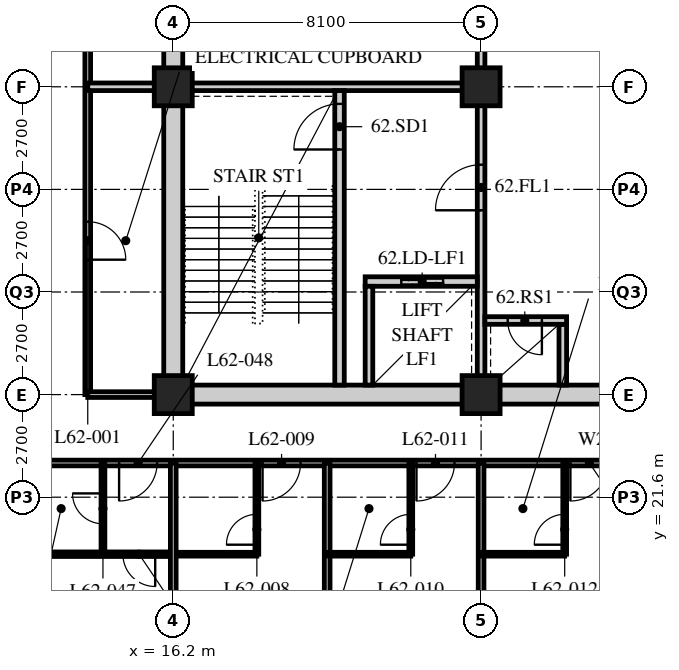
"""IFC4 building model, lengths in metres.
Left out: names, types, materials, properties, quantities, classifications, styles, units other than length and angle.
Written with IfcOpenShell. Run it as: python <this file> out.ifc"""

import sys

from ifc_helpers import new_model, si_unit, direction, frame, frame_2d, origin, origin_2d, place, context, subcontext, project, spatial, rectangle, hollow_rectangle, extrude, element, fill, save


model = new_model("IFC4")
c1 = context("Model", 3, precision=1e-05, world=origin(), true_north=direction((0.0, 1.0)))
c2 = subcontext(c1, "Body", "Model", "MODEL_VIEW")
j1 = project(units=[si_unit("LENGTHUNIT", "METRE"), si_unit("PLANEANGLEUNIT", "RADIAN")], contexts=[c1])
p1 = place(None, origin())
s1 = spatial("IfcSite", under=j1, at=p1, CompositionType="ELEMENT")
p2 = place(p1, origin())
s2 = spatial("IfcBuilding", under=s1, at=p2, CompositionType="ELEMENT")
p3 = place(p2, frame((0.0, 0.0, 242.4)))
s3 = spatial("IfcBuildingStorey", under=s2, at=p3, CompositionType="ELEMENT", Elevation=242.4)
for number, where, z_axis, x_axis in (
    (1, (16.2, 24.3, 0.0), (0.0, 0.0, 1.0), (1.0, 0.0, 0.0)),
    (2, (16.2, 32.4, 0.0), (0.0, 0.0, 1.0), (1.0, 0.0, 0.0)),
    (3, (24.3, 24.3, 0.0), (0.0, 0.0, 1.0), (1.0, 0.0, 0.0)),
    (4, (24.3, 32.4, 0.0), (0.0, 0.0, 1.0), (1.0, 0.0, 0.0)),
):
    element("IfcColumn", number, at=place(p3, frame(where, z_axis=z_axis, x_axis=x_axis)), inside=s3, PredefinedType="COLUMN", context=c2, shape_type="SweptSolid", body=[
        extrude(hollow_rectangle(XDim=1.0, YDim=1.0, WallThickness=0.1, at=origin_2d()), origin(), (0.0, 0.0, 1.0), 3.9),
    ])
p4 = place(p3, frame((12.15, 22.5, 0.0), z_axis=(0.0, 0.0, 1.0), x_axis=(1.0, 0.0, 0.0)))
e5 = element("IfcWall", 5, at=p4, inside=s3, PredefinedType="PARTITIONING", context=c2, shape_type="SweptSolid", body=[
    extrude(rectangle(XDim=32.4, YDim=0.15, at=frame_2d((16.2, 0.0))), origin(), (0.0, 0.0, 1.0), 3.69),
])
p5 = place(p4, frame((6.4, 0.0, 0.0)))
e6 = element("IfcOpeningElement", 6, at=p5, cuts=e5, PredefinedType="OPENING", context=c2, shape_type="SweptSolid", body=[
    extrude(rectangle(XDim=1.0, YDim=2.1, at=frame_2d((0.5, 1.05))), frame((0.0, 0.085, 0.0), z_axis=(0.0, -1.0, 0.0), x_axis=(1.0, 0.0, 0.0)), (0.0, 0.0, 1.0), 0.17),
])
p6 = place(p4, frame((10.45, 0.0, 0.0)))
e7 = element("IfcOpeningElement", 7, at=p6, cuts=e5, PredefinedType="OPENING", context=c2, shape_type="SweptSolid", body=[
    extrude(rectangle(XDim=1.0, YDim=2.1, at=frame_2d((0.5, 1.05))), frame((0.0, 0.085, 0.0), z_axis=(0.0, -1.0, 0.0), x_axis=(1.0, 0.0, 0.0)), (0.0, 0.0, 1.0), 0.17),
])
p7 = place(p4, frame((14.5, 0.0, 0.0)))
e8 = element("IfcOpeningElement", 8, at=p7, cuts=e5, PredefinedType="OPENING", context=c2, shape_type="SweptSolid", body=[
    extrude(rectangle(XDim=1.0, YDim=2.1, at=frame_2d((0.5, 1.05))), frame((0.0, 0.085, 0.0), z_axis=(0.0, -1.0, 0.0), x_axis=(1.0, 0.0, 0.0)), (0.0, 0.0, 1.0), 0.17),
])
p8 = place(p4, frame((17.725, 0.0, 0.0)))
e9 = element("IfcOpeningElement", 9, at=p8, cuts=e5, PredefinedType="OPENING", context=c2, shape_type="SweptSolid", body=[
    extrude(rectangle(XDim=1.0, YDim=2.1, at=frame_2d((0.5, 1.05))), frame((0.0, 0.085, 0.0), z_axis=(0.0, -1.0, 0.0), x_axis=(1.0, 0.0, 0.0)), (0.0, 0.0, 1.0), 0.17),
])
p9 = place(p4, frame((22.6, 0.0, 0.0)))
e10 = element("IfcOpeningElement", 10, at=p9, cuts=e5, PredefinedType="OPENING", context=c2, shape_type="SweptSolid", body=[
    extrude(rectangle(XDim=1.0, YDim=2.1, at=frame_2d((0.5, 1.05))), frame((0.0, 0.085, 0.0), z_axis=(0.0, -1.0, 0.0), x_axis=(1.0, 0.0, 0.0)), (0.0, 0.0, 1.0), 0.17),
])
p10 = place(p4, frame((26.65, 0.0, 0.0)))
e11 = element("IfcOpeningElement", 11, at=p10, cuts=e5, PredefinedType="OPENING", context=c2, shape_type="SweptSolid", body=[
    extrude(rectangle(XDim=1.0, YDim=2.1, at=frame_2d((0.5, 1.05))), frame((0.0, 0.085, 0.0), z_axis=(0.0, -1.0, 0.0), x_axis=(1.0, 0.0, 0.0)), (0.0, 0.0, 1.0), 0.17),
])
p11 = place(p4, frame((2.625, 0.0, 0.0)))
e12 = element("IfcOpeningElement", 12, at=p11, cuts=e5, PredefinedType="OPENING", context=c2, shape_type="SweptSolid", body=[
    extrude(rectangle(XDim=1.0, YDim=2.1, at=frame_2d((0.5, 1.05))), frame((0.0, 0.085, 0.0), z_axis=(0.0, -1.0, 0.0), x_axis=(1.0, 0.0, 0.0)), (0.0, 0.0, 1.0), 0.17),
])
p12 = place(p4, frame((28.775, 0.0, 0.0)))
e13 = element("IfcOpeningElement", 13, at=p12, cuts=e5, PredefinedType="OPENING", context=c2, shape_type="SweptSolid", body=[
    extrude(rectangle(XDim=1.0, YDim=2.1, at=frame_2d((0.5, 1.05))), frame((0.0, 0.085, 0.0), z_axis=(0.0, -1.0, 0.0), x_axis=(1.0, 0.0, 0.0)), (0.0, 0.0, 1.0), 0.17),
])
p13 = place(p3, frame((13.95, 46.8, 0.0), z_axis=(0.0, 0.0, 1.0), x_axis=(0.0, -1.0, 0.0)))
e14 = element("IfcWall", 14, at=p13, inside=s3, PredefinedType="PARTITIONING", context=c2, shape_type="SweptSolid", body=[
    extrude(rectangle(XDim=22.5, YDim=0.15, at=frame_2d((11.25, 0.0))), origin(), (0.0, 0.0, 1.0), 3.69),
])
p14 = place(p13, frame((17.95, 0.0, 0.0)))
e15 = element("IfcOpeningElement", 15, at=p14, cuts=e14, PredefinedType="OPENING", context=c2, shape_type="SweptSolid", body=[
    extrude(rectangle(XDim=1.0, YDim=2.1, at=frame_2d((0.5, 1.05))), frame((0.0, 0.085, 0.0), z_axis=(0.0, -1.0, 0.0), x_axis=(1.0, 0.0, 0.0)), (0.0, 0.0, 1.0), 0.17),
])
p15 = place(p13, frame((9.85, 0.0, 0.0)))
e16 = element("IfcOpeningElement", 16, at=p15, cuts=e14, PredefinedType="OPENING", context=c2, shape_type="SweptSolid", body=[
    extrude(rectangle(XDim=1.0, YDim=2.1, at=frame_2d((0.5, 1.05))), frame((0.0, 0.085, 0.0), z_axis=(0.0, -1.0, 0.0), x_axis=(1.0, 0.0, 0.0)), (0.0, 0.0, 1.0), 0.17),
])
p16 = place(p3, frame((13.95, 24.3, 0.0), z_axis=(0.0, 0.0, 1.0), x_axis=(1.0, 0.0, 0.0)))
e17 = element("IfcWall", 17, at=p16, inside=s3, PredefinedType="PARTITIONING", context=c2, shape_type="SweptSolid", body=[
    extrude(rectangle(XDim=2.05, YDim=0.15, at=frame_2d((1.025, 0.0))), origin(), (0.0, 0.0, 1.0), 2.928),
])
p17 = place(p3, frame((13.95, 32.4, 0.0), z_axis=(0.0, 0.0, 1.0), x_axis=(1.0, 0.0, 0.0)))
e18 = element("IfcWall", 18, at=p17, inside=s3, PredefinedType="SOLIDWALL", context=c2, shape_type="SweptSolid", body=[
    extrude(rectangle(XDim=2.25, YDim=0.2, at=frame_2d((1.125, 0.0))), origin(), (0.0, 0.0, 1.0), 2.928),
])
p18 = place(p3, frame((16.2, 20.1, 0.0), z_axis=(0.0, 0.0, 1.0), x_axis=(1.0, 0.0, 0.0)))
e19 = element("IfcWall", 19, at=p18, inside=s3, PredefinedType="PARTITIONING", context=c2, shape_type="SweptSolid", body=[
    extrude(rectangle(XDim=2.2, YDim=0.1, at=frame_2d((1.1, 0.0))), origin(), (0.0, 0.0, 1.0), 3.69),
])
p19 = place(p3, frame((18.4, 22.5, 0.0), z_axis=(0.0, 0.0, 1.0), x_axis=(0.0, -1.0, 0.0)))
e20 = element("IfcWall", 20, at=p19, inside=s3, PredefinedType="PARTITIONING", context=c2, shape_type="SweptSolid", body=[
    extrude(rectangle(XDim=2.4, YDim=0.1, at=frame_2d((1.2, 0.0))), origin(), (0.0, 0.0, 1.0), 3.69),
])
p20 = place(p19, frame((1.35, 0.0, 0.0)))
e21 = element("IfcOpeningElement", 21, at=p20, cuts=e20, PredefinedType="OPENING", context=c2, shape_type="SweptSolid", body=[
    extrude(rectangle(XDim=0.8, YDim=2.1, at=frame_2d((0.4, 1.05))), frame((0.0, 0.06, 0.0), z_axis=(0.0, -1.0, 0.0), x_axis=(1.0, 0.0, 0.0)), (0.0, 0.0, 1.0), 0.12),
])
p21 = place(p3, frame((20.25, 22.5, 0.0), z_axis=(0.0, 0.0, 1.0), x_axis=(0.0, -1.0, 0.0)))
e22 = element("IfcWall", 22, at=p21, inside=s3, PredefinedType="PARTITIONING", context=c2, shape_type="SweptSolid", body=[
    extrude(rectangle(XDim=6.0, YDim=0.15, at=frame_2d((3.0, 0.0))), origin(), (0.0, 0.0, 1.0), 3.69),
])
p22 = place(p3, frame((20.25, 20.1, 0.0), z_axis=(0.0, 0.0, 1.0), x_axis=(1.0, 0.0, 0.0)))
e23 = element("IfcWall", 23, at=p22, inside=s3, PredefinedType="PARTITIONING", context=c2, shape_type="SweptSolid", body=[
    extrude(rectangle(XDim=2.2, YDim=0.1, at=frame_2d((1.1, 0.0))), origin(), (0.0, 0.0, 1.0), 3.69),
])
p23 = place(p3, frame((22.45, 22.5, 0.0), z_axis=(0.0, 0.0, 1.0), x_axis=(0.0, -1.0, 0.0)))
e24 = element("IfcWall", 24, at=p23, inside=s3, PredefinedType="PARTITIONING", context=c2, shape_type="SweptSolid", body=[
    extrude(rectangle(XDim=2.4, YDim=0.1, at=frame_2d((1.2, 0.0))), origin(), (0.0, 0.0, 1.0), 3.69),
])
p24 = place(p23, frame((1.35, 0.0, 0.0)))
e25 = element("IfcOpeningElement", 25, at=p24, cuts=e24, PredefinedType="OPENING", context=c2, shape_type="SweptSolid", body=[
    extrude(rectangle(XDim=0.8, YDim=2.1, at=frame_2d((0.4, 1.05))), frame((0.0, 0.06, 0.0), z_axis=(0.0, -1.0, 0.0), x_axis=(1.0, 0.0, 0.0)), (0.0, 0.0, 1.0), 0.12),
])
p25 = place(p3, frame((24.3, 22.5, 0.0), z_axis=(0.0, 0.0, 1.0), x_axis=(0.0, -1.0, 0.0)))
e26 = element("IfcWall", 26, at=p25, inside=s3, PredefinedType="PARTITIONING", context=c2, shape_type="SweptSolid", body=[
    extrude(rectangle(XDim=6.0, YDim=0.15, at=frame_2d((3.0, 0.0))), origin(), (0.0, 0.0, 1.0), 2.928),
])
p26 = place(p3, frame((24.3, 20.1, 0.0), z_axis=(0.0, 0.0, 1.0), x_axis=(1.0, 0.0, 0.0)))
e27 = element("IfcWall", 27, at=p26, inside=s3, PredefinedType="PARTITIONING", context=c2, shape_type="SweptSolid", body=[
    extrude(rectangle(XDim=2.2, YDim=0.1, at=frame_2d((1.1, 0.0))), origin(), (0.0, 0.0, 1.0), 3.69),
])
p27 = place(p3, frame((26.5, 22.5, 0.0), z_axis=(0.0, 0.0, 1.0), x_axis=(0.0, -1.0, 0.0)))
e28 = element("IfcWall", 28, at=p27, inside=s3, PredefinedType="PARTITIONING", context=c2, shape_type="SweptSolid", body=[
    extrude(rectangle(XDim=2.4, YDim=0.1, at=frame_2d((1.2, 0.0))), origin(), (0.0, 0.0, 1.0), 3.69),
])
p28 = place(p27, frame((1.35, 0.0, 0.0)))
e29 = element("IfcOpeningElement", 29, at=p28, cuts=e28, PredefinedType="OPENING", context=c2, shape_type="SweptSolid", body=[
    extrude(rectangle(XDim=0.8, YDim=2.1, at=frame_2d((0.4, 1.05))), frame((0.0, 0.06, 0.0), z_axis=(0.0, -1.0, 0.0), x_axis=(1.0, 0.0, 0.0)), (0.0, 0.0, 1.0), 0.12),
])
p29 = place(p3, frame((12.15, 20.1, 0.0), z_axis=(0.0, 0.0, 1.0), x_axis=(1.0, 0.0, 0.0)))
e30 = element("IfcWall", 30, at=p29, inside=s3, PredefinedType="PARTITIONING", context=c2, shape_type="SweptSolid", body=[
    extrude(rectangle(XDim=4.05, YDim=0.12, at=frame_2d((2.025, 0.0))), origin(), (0.0, 0.0, 1.0), 3.69),
])
p30 = place(p29, frame((2.725, 0.0, 0.0)))
e31 = element("IfcOpeningElement", 31, at=p30, cuts=e30, PredefinedType="OPENING", context=c2, shape_type="SweptSolid", body=[
    extrude(rectangle(XDim=0.85, YDim=2.1, at=frame_2d((0.425, 1.05))), frame((0.0, 0.07, 0.0), z_axis=(0.0, -1.0, 0.0), x_axis=(1.0, 0.0, 0.0)), (0.0, 0.0, 1.0), 0.14),
])
p31 = place(p3, frame((14.35, 22.5, 0.0), z_axis=(0.0, 0.0, 1.0), x_axis=(0.0, -1.0, 0.0)))
e32 = element("IfcWall", 32, at=p31, inside=s3, PredefinedType="PARTITIONING", context=c2, shape_type="SweptSolid", body=[
    extrude(rectangle(XDim=2.4, YDim=0.1, at=frame_2d((1.2, 0.0))), origin(), (0.0, 0.0, 1.0), 3.69),
])
p32 = place(p31, frame((0.8, 0.0, 0.0)))
e33 = element("IfcOpeningElement", 33, at=p32, cuts=e32, PredefinedType="OPENING", context=c2, shape_type="SweptSolid", body=[
    extrude(rectangle(XDim=0.8, YDim=2.1, at=frame_2d((0.4, 1.05))), frame((0.0, 0.06, 0.0), z_axis=(0.0, -1.0, 0.0), x_axis=(1.0, 0.0, 0.0)), (0.0, 0.0, 1.0), 0.12),
])
p33 = place(p3, frame((16.2, 22.5, 0.0), z_axis=(0.0, 0.0, 1.0), x_axis=(0.0, -1.0, 0.0)))
e34 = element("IfcWall", 34, at=p33, inside=s3, PredefinedType="PARTITIONING", context=c2, shape_type="SweptSolid", body=[
    extrude(rectangle(XDim=6.0, YDim=0.15, at=frame_2d((3.0, 0.0))), origin(), (0.0, 0.0, 1.0), 2.928),
])
p34 = place(p3, frame((15.95, 24.3, 0.0), z_axis=(0.0, 0.0, 1.0), x_axis=(1.0, 0.0, 0.0)))
e35 = element("IfcWall", 35, at=p34, inside=s3, PredefinedType="SOLIDWALL", context=c2, shape_type="SweptSolid", body=[
    extrude(rectangle(XDim=24.8, YDim=0.5, at=frame_2d((12.4, 0.0))), origin(), (0.0, 0.0, 1.0), 2.928),
])
p35 = place(p34, frame((11.5, 0.0, 0.0)))
e36 = element("IfcOpeningElement", 36, at=p35, cuts=e35, PredefinedType="OPENING", context=c2, shape_type="SweptSolid", body=[
    extrude(rectangle(XDim=1.8, YDim=2.4, at=frame_2d((0.9, 1.2))), frame((0.0, 0.26, 0.0), z_axis=(0.0, -1.0, 0.0), x_axis=(1.0, 0.0, 0.0)), (0.0, 0.0, 1.0), 0.52),
])
p36 = place(p3, frame((16.2, 24.55, 0.0), z_axis=(0.0, 0.0, 1.0), x_axis=(0.0, 1.0, 0.0)))
e37 = element("IfcWall", 37, at=p36, inside=s3, PredefinedType="SOLIDWALL", context=c2, shape_type="SweptSolid", body=[
    extrude(rectangle(XDim=15.7, YDim=0.5, at=frame_2d((7.85, 0.0))), origin(), (0.0, 0.0, 1.0), 2.928),
])
p37 = place(p3, frame((16.45, 32.4, 0.0), z_axis=(0.0, 0.0, 1.0), x_axis=(1.0, 0.0, 0.0)))
e38 = element("IfcWall", 38, at=p37, inside=s3, PredefinedType="SOLIDWALL", context=c2, shape_type="SweptSolid", body=[
    extrude(rectangle(XDim=7.95, YDim=0.2, at=frame_2d((3.975, 0.0))), origin(), (0.0, 0.0, 1.0), 3.078),
])
p38 = place(p3, frame((24.3, 24.55, 0.0), z_axis=(0.0, 0.0, 1.0), x_axis=(0.0, 1.0, 0.0)))
e39 = element("IfcWall", 39, at=p38, inside=s3, PredefinedType="SOLIDWALL", context=c2, shape_type="SweptSolid", body=[
    extrude(rectangle(XDim=7.75, YDim=0.2, at=frame_2d((3.875, 0.0))), origin(), (0.0, 0.0, 1.0), 3.078),
])
p39 = place(p38, frame((4.6, 0.0, 0.0)))
e40 = element("IfcOpeningElement", 40, at=p39, cuts=e39, PredefinedType="OPENING", context=c2, shape_type="SweptSolid", body=[
    extrude(rectangle(XDim=1.2, YDim=2.1, at=frame_2d((0.6, 1.05))), frame((0.0, 0.11, 0.0), z_axis=(0.0, -1.0, 0.0), x_axis=(1.0, 0.0, 0.0)), (0.0, 0.0, 1.0), 0.22),
])
p40 = place(p3, frame((20.575, 24.55, 0.0), z_axis=(0.0, 0.0, 1.0), x_axis=(0.0, 1.0, 0.0)))
e41 = element("IfcWall", 41, at=p40, inside=s3, PredefinedType="SOLIDWALL", context=c2, shape_type="SweptSolid", body=[
    extrude(rectangle(XDim=7.75, YDim=0.25, at=frame_2d((3.875, 0.0))), origin(), (0.0, 0.0, 1.0), 3.69),
])
p41 = place(p40, frame((6.2, 0.0, 0.0)))
e42 = element("IfcOpeningElement", 42, at=p41, cuts=e41, PredefinedType="OPENING", context=c2, shape_type="SweptSolid", body=[
    extrude(rectangle(XDim=1.2, YDim=2.1, at=frame_2d((0.6, 1.05))), frame((0.0, 0.135, 0.0), z_axis=(0.0, -1.0, 0.0), x_axis=(1.0, 0.0, 0.0)), (0.0, 0.0, 1.0), 0.27),
])
p42 = place(p3, frame((21.25, 27.275, 0.0), z_axis=(0.0, 0.0, 1.0), x_axis=(1.0, 0.0, 0.0)))
e43 = element("IfcWall", 43, at=p42, inside=s3, PredefinedType="SOLIDWALL", context=c2, shape_type="SweptSolid", body=[
    extrude(rectangle(XDim=2.95, YDim=0.25, at=frame_2d((1.475, 0.0))), origin(), (0.0, 0.0, 1.0), 3.69),
])
p43 = place(p42, frame((0.95, 0.0, 0.0)))
e44 = element("IfcOpeningElement", 44, at=p43, cuts=e43, PredefinedType="OPENING", context=c2, shape_type="SweptSolid", body=[
    extrude(rectangle(XDim=1.1, YDim=2.4, at=frame_2d((0.55, 1.2))), frame((0.0, 0.135, 0.0), z_axis=(0.0, -1.0, 0.0), x_axis=(1.0, 0.0, 0.0)), (0.0, 0.0, 1.0), 0.27),
])
p44 = place(p3, frame((21.35, 24.55, 0.0), z_axis=(0.0, 0.0, 1.0), x_axis=(0.0, 1.0, 0.0)))
e45 = element("IfcWall", 45, at=p44, inside=s3, PredefinedType="SOLIDWALL", context=c2, shape_type="SweptSolid", body=[
    extrude(rectangle(XDim=2.6, YDim=0.2, at=frame_2d((1.3, 0.0))), origin(), (0.0, 0.0, 1.0), 3.69),
])
p45 = place(p3, frame((26.45, 24.55, 0.0), z_axis=(0.0, 0.0, 1.0), x_axis=(0.0, 1.0, 0.0)))
e46 = element("IfcWall", 46, at=p45, inside=s3, PredefinedType="SOLIDWALL", context=c2, shape_type="SweptSolid", body=[
    extrude(rectangle(XDim=1.6, YDim=0.2, at=frame_2d((0.8, 0.0))), origin(), (0.0, 0.0, 1.0), 3.69),
])
p46 = place(p3, frame((24.4, 26.25, 0.0), z_axis=(0.0, 0.0, 1.0), x_axis=(1.0, 0.0, 0.0)))
e47 = element("IfcWall", 47, at=p46, inside=s3, PredefinedType="SOLIDWALL", context=c2, shape_type="SweptSolid", body=[
    extrude(rectangle(XDim=2.15, YDim=0.2, at=frame_2d((1.075, 0.0))), origin(), (0.0, 0.0, 1.0), 3.69),
])
p47 = place(p46, frame((0.6, 0.0, 0.0)))
e48 = element("IfcOpeningElement", 48, at=p47, cuts=e47, PredefinedType="OPENING", context=c2, shape_type="SweptSolid", body=[
    extrude(rectangle(XDim=0.9, YDim=2.1, at=frame_2d((0.45, 1.05))), frame((0.0, 0.11, 0.0), z_axis=(0.0, -1.0, 0.0), x_axis=(1.0, 0.0, 0.0)), (0.0, 0.0, 1.0), 0.22),
])
p48 = place(p3, frame((24.3, 32.5, 0.0), z_axis=(0.0, 0.0, 1.0), x_axis=(0.0, 1.0, 0.0)))
e49 = element("IfcWall", 49, at=p48, inside=s3, PredefinedType="PARTITIONING", context=c2, shape_type="SweptSolid", body=[
    extrude(rectangle(XDim=7.75, YDim=0.2, at=frame_2d((3.875, 0.0))), origin(), (0.0, 0.0, 1.0), 3.078),
])
p49 = place(p48, frame((2.4, 0.0, 0.0)))
e50 = element("IfcOpeningElement", 50, at=p49, cuts=e49, PredefinedType="OPENING", context=c2, shape_type="SweptSolid", body=[
    extrude(rectangle(XDim=0.9, YDim=2.1, at=frame_2d((0.45, 1.05))), frame((0.0, 0.11, 0.0), z_axis=(0.0, -1.0, 0.0), x_axis=(1.0, 0.0, 0.0)), (0.0, 0.0, 1.0), 0.22),
])
p50 = place(p48, frame((6.2, 0.0, 0.0)))
e51 = element("IfcOpeningElement", 51, at=p50, cuts=e49, PredefinedType="OPENING", context=c2, shape_type="SweptSolid", body=[
    extrude(rectangle(XDim=0.9, YDim=2.1, at=frame_2d((0.45, 1.05))), frame((0.0, 0.11, 0.0), z_axis=(0.0, -1.0, 0.0), x_axis=(1.0, 0.0, 0.0)), (0.0, 0.0, 1.0), 0.22),
])
p51 = place(p14, origin())
e52 = element("IfcDoor", 52, at=p51, inside=s3, OperationType="SINGLE_SWING_RIGHT", PredefinedType="DOOR", context=c2, shape_type="SweptSolid", body=[
    extrude(rectangle(XDim=1.0, YDim=2.1, at=frame_2d((0.5, 1.05))), frame((0.0, 0.025, 0.0), z_axis=(0.0, -1.0, 0.0), x_axis=(1.0, 0.0, 0.0)), (0.0, 0.0, 1.0), 0.05),
])
fill(e15, e52)
p52 = place(p20, origin())
e53 = element("IfcDoor", 53, at=p52, inside=s3, OperationType="SINGLE_SWING_LEFT", PredefinedType="DOOR", context=c2, shape_type="SweptSolid", body=[
    extrude(rectangle(XDim=0.8, YDim=2.1, at=frame_2d((0.4, 1.05))), frame((0.0, 0.025, 0.0), z_axis=(0.0, -1.0, 0.0), x_axis=(1.0, 0.0, 0.0)), (0.0, 0.0, 1.0), 0.05),
])
fill(e21, e53)
p53 = place(p5, origin())
e54 = element("IfcDoor", 54, at=p53, inside=s3, OperationType="SINGLE_SWING_RIGHT", PredefinedType="DOOR", context=c2, shape_type="SweptSolid", body=[
    extrude(rectangle(XDim=1.0, YDim=2.1, at=frame_2d((0.5, 1.05))), frame((0.0, 0.025, 0.0), z_axis=(0.0, -1.0, 0.0), x_axis=(1.0, 0.0, 0.0)), (0.0, 0.0, 1.0), 0.05),
])
fill(e6, e54)
p54 = place(p24, origin())
e55 = element("IfcDoor", 55, at=p54, inside=s3, OperationType="SINGLE_SWING_LEFT", PredefinedType="DOOR", context=c2, shape_type="SweptSolid", body=[
    extrude(rectangle(XDim=0.8, YDim=2.1, at=frame_2d((0.4, 1.05))), frame((0.0, 0.025, 0.0), z_axis=(0.0, -1.0, 0.0), x_axis=(1.0, 0.0, 0.0)), (0.0, 0.0, 1.0), 0.05),
])
fill(e25, e55)
p55 = place(p6, origin())
e56 = element("IfcDoor", 56, at=p55, inside=s3, OperationType="SINGLE_SWING_RIGHT", PredefinedType="DOOR", context=c2, shape_type="SweptSolid", body=[
    extrude(rectangle(XDim=1.0, YDim=2.1, at=frame_2d((0.5, 1.05))), frame((0.0, 0.025, 0.0), z_axis=(0.0, -1.0, 0.0), x_axis=(1.0, 0.0, 0.0)), (0.0, 0.0, 1.0), 0.05),
])
fill(e7, e56)
p56 = place(p28, origin())
e57 = element("IfcDoor", 57, at=p56, inside=s3, OperationType="SINGLE_SWING_LEFT", PredefinedType="DOOR", context=c2, shape_type="SweptSolid", body=[
    extrude(rectangle(XDim=0.8, YDim=2.1, at=frame_2d((0.4, 1.05))), frame((0.0, 0.025, 0.0), z_axis=(0.0, -1.0, 0.0), x_axis=(1.0, 0.0, 0.0)), (0.0, 0.0, 1.0), 0.05),
])
fill(e29, e57)
p57 = place(p7, origin())
e58 = element("IfcDoor", 58, at=p57, inside=s3, OperationType="SINGLE_SWING_RIGHT", PredefinedType="DOOR", context=c2, shape_type="SweptSolid", body=[
    extrude(rectangle(XDim=1.0, YDim=2.1, at=frame_2d((0.5, 1.05))), frame((0.0, 0.025, 0.0), z_axis=(0.0, -1.0, 0.0), x_axis=(1.0, 0.0, 0.0)), (0.0, 0.0, 1.0), 0.05),
])
fill(e8, e58)
p58 = place(p32, origin())
e59 = element("IfcDoor", 59, at=p58, inside=s3, OperationType="SINGLE_SWING_RIGHT", PredefinedType="DOOR", context=c2, shape_type="SweptSolid", body=[
    extrude(rectangle(XDim=0.8, YDim=2.1, at=frame_2d((0.4, 1.05))), frame((0.0, 0.025, 0.0), z_axis=(0.0, -1.0, 0.0), x_axis=(1.0, 0.0, 0.0)), (0.0, 0.0, 1.0), 0.05),
])
fill(e33, e59)
p59 = place(p11, origin())
e60 = element("IfcDoor", 60, at=p59, inside=s3, OperationType="SINGLE_SWING_RIGHT", PredefinedType="DOOR", context=c2, shape_type="SweptSolid", body=[
    extrude(rectangle(XDim=1.0, YDim=2.1, at=frame_2d((0.5, 1.05))), frame((0.0, 0.025, 0.0), z_axis=(0.0, -1.0, 0.0), x_axis=(1.0, 0.0, 0.0)), (0.0, 0.0, 1.0), 0.05),
])
fill(e12, e60)
p60 = place(p30, origin())
e61 = element("IfcDoor", 61, at=p60, inside=s3, OperationType="SINGLE_SWING_LEFT", PredefinedType="DOOR", context=c2, shape_type="SweptSolid", body=[
    extrude(rectangle(XDim=0.85, YDim=2.1, at=frame_2d((0.425, 1.05))), frame((0.0, 0.025, 0.0), z_axis=(0.0, -1.0, 0.0), x_axis=(1.0, 0.0, 0.0)), (0.0, 0.0, 1.0), 0.05),
])
fill(e31, e61)
p61 = place(p41, origin())
e62 = element("IfcDoor", 62, at=p61, inside=s3, OperationType="SINGLE_SWING_LEFT", PredefinedType="DOOR", context=c2, shape_type="SweptSolid", body=[
    extrude(rectangle(XDim=1.2, YDim=2.1, at=frame_2d((0.6, 1.05))), frame((0.0, 0.025, 0.0), z_axis=(0.0, -1.0, 0.0), x_axis=(1.0, 0.0, 0.0)), (0.0, 0.0, 1.0), 0.05),
])
fill(e42, e62)
p62 = place(p39, origin())
e63 = element("IfcDoor", 63, at=p62, inside=s3, OperationType="SINGLE_SWING_LEFT", PredefinedType="DOOR", context=c2, shape_type="SweptSolid", body=[
    extrude(rectangle(XDim=1.2, YDim=2.1, at=frame_2d((0.6, 1.05))), frame((0.0, 0.025, 0.0), z_axis=(0.0, -1.0, 0.0), x_axis=(1.0, 0.0, 0.0)), (0.0, 0.0, 1.0), 0.05),
])
fill(e40, e63)
p63 = place(p47, origin())
e64 = element("IfcDoor", 64, at=p63, inside=s3, OperationType="SINGLE_SWING_LEFT", PredefinedType="DOOR", context=c2, shape_type="SweptSolid", body=[
    extrude(rectangle(XDim=0.9, YDim=2.1, at=frame_2d((0.45, 1.05))), frame((0.0, 0.025, 0.0), z_axis=(0.0, -1.0, 0.0), x_axis=(1.0, 0.0, 0.0)), (0.0, 0.0, 1.0), 0.05),
])
fill(e48, e64)
p64 = place(p43, origin())
e65 = element("IfcDoor", 65, at=p64, inside=s3, OperationType="DOUBLE_DOOR_SLIDING", PredefinedType="DOOR", context=c2, shape_type="SweptSolid", body=[
    extrude(rectangle(XDim=1.1, YDim=2.4, at=frame_2d((0.55, 1.2))), frame((0.0, 0.025, 0.0), z_axis=(0.0, -1.0, 0.0), x_axis=(1.0, 0.0, 0.0)), (0.0, 0.0, 1.0), 0.05),
])
fill(e44, e65)
save(model, sys.argv[1])
